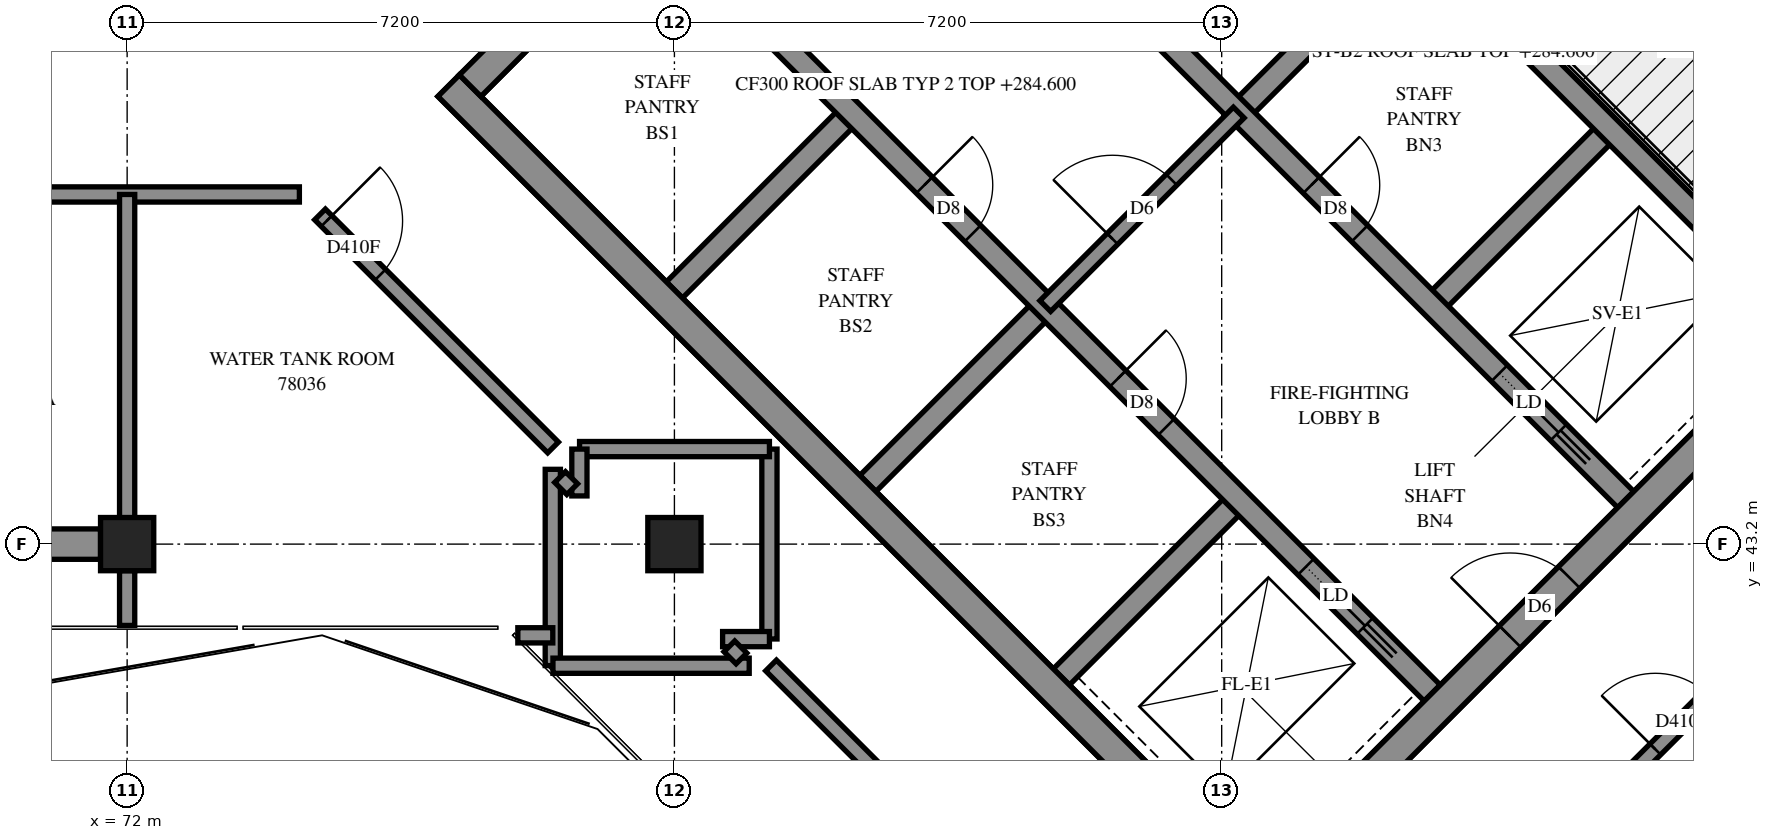
"""IFC4 building model, lengths in metres.
Left out: names, types, materials, properties, quantities, classifications, styles, units other than length and angle.
Written with IfcOpenShell. Run it as: python <this file> out.ifc"""

import sys

from ifc_helpers import new_model, si_unit, direction, frame, frame_2d, origin, origin_2d, place, context, subcontext, project, spatial, rectangle, extrude, element, fill, save


model = new_model("IFC4")
c1 = context("Model", 3, precision=1e-05, world=origin(), true_north=direction((0.0, 1.0)))
c2 = subcontext(c1, "Body", "Model", "MODEL_VIEW")
j1 = project(units=[si_unit("LENGTHUNIT", "METRE"), si_unit("PLANEANGLEUNIT", "RADIAN")], contexts=[c1])
p1 = place(None, origin())
s1 = spatial("IfcSite", under=j1, at=p1, CompositionType="ELEMENT")
p2 = place(p1, origin())
s2 = spatial("IfcBuilding", under=s1, at=p2, CompositionType="ELEMENT")
p3 = place(p2, frame((0.0, 0.0, 284.6)))
s3 = spatial("IfcBuildingStorey", under=s2, at=p3, CompositionType="ELEMENT", Elevation=284.6)
for number, where, z_axis, x_axis in (
    (1, (72.0, 43.2, 0.0), (0.0, 0.0, 1.0), (1.0, 0.0, 0.0)),
    (2, (79.2, 43.2, 0.0), (0.0, 0.0, 1.0), (1.0, 0.0, 0.0)),
):
    element("IfcColumn", number, at=place(p3, frame(where, z_axis=z_axis, x_axis=x_axis)), inside=s3, PredefinedType="COLUMN", context=c2, shape_type="SweptSolid", body=[
        extrude(rectangle(XDim=0.7, YDim=0.7, at=origin_2d()), origin(), (0.0, 0.0, 1.0), 5.7),
    ])
p4 = place(p3, frame((76.23, 49.231, -0.3), z_axis=(0.0, 0.0, 1.0), x_axis=(0.7071034917, -0.7071100706, 0.0)))
e3 = element("IfcWall", 3, at=p4, inside=s3, PredefinedType="SHEAR", context=c2, shape_type="SweptSolid", body=[
    extrude(rectangle(XDim=15.2, YDim=0.4, at=frame_2d((7.6, 0.0))), origin(), (0.0, 0.0, 1.0), 5.3),
])
p5 = place(p3, frame((86.695, 59.696, -0.3), z_axis=(0.0, 0.0, 1.0), x_axis=(0.7071100706, -0.7071034917, 0.0)))
e4 = element("IfcWall", 4, at=p5, inside=s3, PredefinedType="SHEAR", context=c2, shape_type="SweptSolid", body=[
    extrude(rectangle(XDim=15.2, YDim=0.4, at=frame_2d((7.6, 0.0))), origin(), (0.0, 0.0, 1.0), 5.3),
])
p6 = place(p5, frame((10.4, 0.0, 0.3)))
e5 = element("IfcOpeningElement", 5, at=p6, cuts=e4, PredefinedType="OPENING", context=c2, shape_type="SweptSolid", body=[
    extrude(rectangle(XDim=0.8, YDim=2.1, at=frame_2d((0.4, 1.05))), frame((0.0, 0.21, 0.0), z_axis=(0.0, -1.0, 0.0), x_axis=(1.0, 0.0, 0.0)), (0.0, 0.0, 1.0), 0.42),
])
p7 = place(p3, frame((76.513, 49.231, -0.3), z_axis=(0.0, 0.0, 1.0), x_axis=(0.7071067812, 0.7071067812, 0.0)))
e6 = element("IfcWall", 6, at=p7, inside=s3, PredefinedType="SHEAR", context=c2, shape_type="SweptSolid", body=[
    extrude(rectangle(XDim=14.4, YDim=0.4, at=frame_2d((7.2, 0.0))), origin(), (0.0, 0.0, 1.0), 5.3),
])
p8 = place(p7, frame((4.55, 0.0, 0.3)))
e7 = element("IfcOpeningElement", 7, at=p8, cuts=e6, PredefinedType="OPENING", context=c2, shape_type="SweptSolid", body=[
    extrude(rectangle(XDim=1.1, YDim=2.1, at=frame_2d((0.55, 1.05))), frame((0.0, 0.21, 0.0), z_axis=(0.0, -1.0, 0.0), x_axis=(1.0, 0.0, 0.0)), (0.0, 0.0, 1.0), 0.42),
])
p9 = place(p7, frame((11.35, 0.0, 0.3)))
e8 = element("IfcOpeningElement", 8, at=p9, cuts=e6, PredefinedType="OPENING", context=c2, shape_type="SweptSolid", body=[
    extrude(rectangle(XDim=1.1, YDim=2.1, at=frame_2d((0.55, 1.05))), frame((0.0, 0.21, 0.0), z_axis=(0.0, -1.0, 0.0), x_axis=(1.0, 0.0, 0.0)), (0.0, 0.0, 1.0), 0.42),
])
p10 = place(p3, frame((86.978, 38.766, -0.3), z_axis=(0.0, 0.0, 1.0), x_axis=(0.7071067812, 0.7071067812, 0.0)))
e9 = element("IfcWall", 9, at=p10, inside=s3, PredefinedType="SHEAR", context=c2, shape_type="SweptSolid", body=[
    extrude(rectangle(XDim=14.4, YDim=0.4, at=frame_2d((7.2, 0.0))), origin(), (0.0, 0.0, 1.0), 5.3),
])
p11 = place(p10, frame((4.55, 0.0, 0.3)))
e10 = element("IfcOpeningElement", 10, at=p11, cuts=e9, PredefinedType="OPENING", context=c2, shape_type="SweptSolid", body=[
    extrude(rectangle(XDim=1.1, YDim=2.1, at=frame_2d((0.55, 1.05))), frame((0.0, 0.21, 0.0), z_axis=(0.0, -1.0, 0.0), x_axis=(1.0, 0.0, 0.0)), (0.0, 0.0, 1.0), 0.42),
])
p12 = place(p10, frame((11.35, 0.0, 0.3)))
e11 = element("IfcOpeningElement", 11, at=p12, cuts=e9, PredefinedType="OPENING", context=c2, shape_type="SweptSolid", body=[
    extrude(rectangle(XDim=1.1, YDim=2.1, at=frame_2d((0.55, 1.05))), frame((0.0, 0.21, 0.0), z_axis=(0.0, -1.0, 0.0), x_axis=(1.0, 0.0, 0.0)), (0.0, 0.0, 1.0), 0.42),
])
p13 = place(p3, frame((79.2, 46.544, 0.0), z_axis=(0.0, 0.0, 1.0), x_axis=(0.7071219326, 0.7070916295, 0.0)))
e12 = element("IfcWall", 12, at=p13, inside=s3, PredefinedType="SOLIDWALL", context=c2, shape_type="SweptSolid", body=[
    extrude(rectangle(XDim=3.3, YDim=0.3, at=frame_2d((1.65, 0.0))), origin(), (0.0, 0.0, 1.0), 5.7),
])
p14 = place(p3, frame((81.746, 43.999, 0.0), z_axis=(0.0, 0.0, 1.0), x_axis=(0.7071067812, 0.7071067812, 0.0)))
e13 = element("IfcWall", 13, at=p14, inside=s3, PredefinedType="SOLIDWALL", context=c2, shape_type="SweptSolid", body=[
    extrude(rectangle(XDim=3.3, YDim=0.3, at=frame_2d((1.65, 0.0))), origin(), (0.0, 0.0, 1.0), 5.7),
])
p15 = place(p3, frame((86.625, 48.878, 0.0), z_axis=(0.0, 0.0, 1.0), x_axis=(0.7071067812, 0.7071067812, 0.0)))
e14 = element("IfcWall", 14, at=p15, inside=s3, PredefinedType="SOLIDWALL", context=c2, shape_type="SweptSolid", body=[
    extrude(rectangle(XDim=3.3, YDim=0.3, at=frame_2d((1.65, 0.0))), origin(), (0.0, 0.0, 1.0), 5.7),
])
p16 = place(p3, frame((84.291, 41.453, 0.0), z_axis=(0.0, 0.0, 1.0), x_axis=(0.7071067812, 0.7071067812, 0.0)))
e15 = element("IfcWall", 15, at=p16, inside=s3, PredefinedType="SOLIDWALL", context=c2, shape_type="SweptSolid", body=[
    extrude(rectangle(XDim=3.3, YDim=0.3, at=frame_2d((1.65, 0.0))), origin(), (0.0, 0.0, 1.0), 5.7),
])
p17 = place(p3, frame((89.17, 46.332, 0.0), z_axis=(0.0, 0.0, 1.0), x_axis=(0.7071067812, 0.7071067812, 0.0)))
e16 = element("IfcWall", 16, at=p17, inside=s3, PredefinedType="SOLIDWALL", context=c2, shape_type="SweptSolid", body=[
    extrude(rectangle(XDim=3.3, YDim=0.3, at=frame_2d((1.65, 0.0))), origin(), (0.0, 0.0, 1.0), 5.7),
])
p18 = place(p3, frame((78.988, 51.423, 0.0), z_axis=(0.0, 0.0, 1.0), x_axis=(0.7071067812, -0.7071067812, 0.0)))
e17 = element("IfcWall", 17, at=p18, inside=s3, PredefinedType="SOLIDWALL", context=c2, shape_type="SweptSolid", body=[
    extrude(rectangle(XDim=14.4, YDim=0.3, at=frame_2d((7.2, 0.0))), origin(), (0.0, 0.0, 1.0), 5.7),
])
p19 = place(p18, frame((1.35, 0.0, 0.0)))
e18 = element("IfcOpeningElement", 18, at=p19, cuts=e17, PredefinedType="OPENING", context=c2, shape_type="SweptSolid", body=[
    extrude(rectangle(XDim=0.9, YDim=2.1, at=frame_2d((0.45, 1.05))), frame((0.0, 0.16, 0.0), z_axis=(0.0, -1.0, 0.0), x_axis=(1.0, 0.0, 0.0)), (0.0, 0.0, 1.0), 0.32),
])
p20 = place(p18, frame((4.95, 0.0, 0.0)))
e19 = element("IfcOpeningElement", 19, at=p20, cuts=e17, PredefinedType="OPENING", context=c2, shape_type="SweptSolid", body=[
    extrude(rectangle(XDim=0.9, YDim=2.1, at=frame_2d((0.45, 1.05))), frame((0.0, 0.16, 0.0), z_axis=(0.0, -1.0, 0.0), x_axis=(1.0, 0.0, 0.0)), (0.0, 0.0, 1.0), 0.32),
])
p21 = place(p18, frame((8.55, 0.0, 0.0)))
e20 = element("IfcOpeningElement", 20, at=p21, cuts=e17, PredefinedType="OPENING", context=c2, shape_type="SweptSolid", body=[
    extrude(rectangle(XDim=0.9, YDim=2.1, at=frame_2d((0.45, 1.05))), frame((0.0, 0.16, 0.0), z_axis=(0.0, -1.0, 0.0), x_axis=(1.0, 0.0, 0.0)), (0.0, 0.0, 1.0), 0.32),
])
p22 = place(p18, frame((12.05, 0.0, 0.0)))
e21 = element("IfcOpeningElement", 21, at=p22, cuts=e17, PredefinedType="OPENING", context=c2, shape_type="SweptSolid", body=[
    extrude(rectangle(XDim=1.1, YDim=2.1, at=frame_2d((0.55, 1.05))), frame((0.0, 0.16, 0.0), z_axis=(0.0, -1.0, 0.0), x_axis=(1.0, 0.0, 0.0)), (0.0, 0.0, 1.0), 0.32),
])
p23 = place(p3, frame((81.534, 53.969, 0.0), z_axis=(0.0, 0.0, 1.0), x_axis=(0.707103309, -0.7071102534, 0.0)))
e22 = element("IfcWall", 22, at=p23, inside=s3, PredefinedType="SOLIDWALL", context=c2, shape_type="SweptSolid", body=[
    extrude(rectangle(XDim=14.4, YDim=0.3, at=frame_2d((7.2, 0.0))), origin(), (0.0, 0.0, 1.0), 5.7),
])
p24 = place(p23, frame((8.55, 0.0, 0.0)))
e23 = element("IfcOpeningElement", 23, at=p24, cuts=e22, PredefinedType="OPENING", context=c2, shape_type="SweptSolid", body=[
    extrude(rectangle(XDim=0.9, YDim=2.1, at=frame_2d((0.45, 1.05))), frame((0.0, 0.16, 0.0), z_axis=(0.0, -1.0, 0.0), x_axis=(1.0, 0.0, 0.0)), (0.0, 0.0, 1.0), 0.32),
])
p25 = place(p23, frame((12.05, 0.0, 0.0)))
e24 = element("IfcOpeningElement", 24, at=p25, cuts=e22, PredefinedType="OPENING", context=c2, shape_type="SweptSolid", body=[
    extrude(rectangle(XDim=1.1, YDim=2.1, at=frame_2d((0.55, 1.05))), frame((0.0, 0.16, 0.0), z_axis=(0.0, -1.0, 0.0), x_axis=(1.0, 0.0, 0.0)), (0.0, 0.0, 1.0), 0.32),
])
p26 = place(p3, frame((88.958, 51.211, 0.0), z_axis=(0.0, 0.0, 1.0), x_axis=(0.7070998367, -0.7071137256, 0.0)))
e25 = element("IfcWall", 25, at=p26, inside=s3, PredefinedType="SOLIDWALL", context=c2, shape_type="SweptSolid", body=[
    extrude(rectangle(XDim=7.2, YDim=0.3, at=frame_2d((3.6, 0.0))), origin(), (0.0, 0.0, 1.0), 5.7),
])
p27 = place(p3, frame((91.313, 53.354, 0.0), z_axis=(0.0, 0.0, 1.0), x_axis=(0.7071140275, -0.7070995348, 0.0)))
e26 = element("IfcWall", 26, at=p27, inside=s3, PredefinedType="PARTITIONING", context=c2, shape_type="SweptSolid", body=[
    extrude(rectangle(XDim=6.9, YDim=0.15, at=frame_2d((3.45, 0.0))), origin(), (0.0, 0.0, 1.0), 5.7),
])
p28 = place(p3, frame((84.079, 46.332, 0.0), z_axis=(0.0, 0.0, 1.0), x_axis=(0.7071067812, 0.7071067812, 0.0)))
e27 = element("IfcWall", 27, at=p28, inside=s3, PredefinedType="PARTITIONING", context=c2, shape_type="SweptSolid", body=[
    extrude(rectangle(XDim=3.6, YDim=0.2, at=frame_2d((1.8, 0.0))), origin(), (0.0, 0.0, 1.0), 5.7),
])
p29 = place(p28, frame((1.25, 0.0, 0.0)))
e28 = element("IfcOpeningElement", 28, at=p29, cuts=e27, PredefinedType="OPENING", context=c2, shape_type="SweptSolid", body=[
    extrude(rectangle(XDim=1.1, YDim=2.1, at=frame_2d((0.55, 1.05))), frame((0.0, 0.11, 0.0), z_axis=(0.0, -1.0, 0.0), x_axis=(1.0, 0.0, 0.0)), (0.0, 0.0, 1.0), 0.22),
])
p30 = place(p3, frame((86.833, 62.947, 0.0), z_axis=(0.0, 0.0, 1.0), x_axis=(0.7071067812, -0.7071067812, 0.0)))
e29 = element("IfcWall", 29, at=p30, inside=s3, PredefinedType="PARTITIONING", context=c2, shape_type="SweptSolid", body=[
    extrude(rectangle(XDim=19.601, YDim=0.2, at=frame_2d((9.8, 0.0))), origin(), (0.0, 0.0, 1.0), 5.7),
])
p31 = place(p30, frame((6.487, 0.0, 0.0)))
e30 = element("IfcOpeningElement", 30, at=p31, cuts=e29, PredefinedType="OPENING", context=c2, shape_type="SweptSolid", body=[
    extrude(rectangle(XDim=1.0, YDim=2.1, at=frame_2d((0.5, 1.05))), frame((0.0, 0.11, 0.0), z_axis=(0.0, -1.0, 0.0), x_axis=(1.0, 0.0, 0.0)), (0.0, 0.0, 1.0), 0.22),
])
p32 = place(p30, frame((13.688, 0.0, 0.0)))
e31 = element("IfcOpeningElement", 31, at=p32, cuts=e29, PredefinedType="OPENING", context=c2, shape_type="SweptSolid", body=[
    extrude(rectangle(XDim=1.0, YDim=2.1, at=frame_2d((0.5, 1.05))), frame((0.0, 0.11, 0.0), z_axis=(0.0, -1.0, 0.0), x_axis=(1.0, 0.0, 0.0)), (0.0, 0.0, 1.0), 0.22),
])
p33 = place(p3, frame((55.0, 47.8, 0.0), z_axis=(0.0, 0.0, 1.0), x_axis=(1.0, 0.0, 0.0)))
e32 = element("IfcWall", 32, at=p33, inside=s3, PredefinedType="PARTITIONING", context=c2, shape_type="SweptSolid", body=[
    extrude(rectangle(XDim=19.266, YDim=0.2, at=frame_2d((9.633, 0.0))), origin(), (0.0, 0.0, 1.0), 5.7),
])
p34 = place(p33, frame((4.633, 0.0, 0.0)))
e33 = element("IfcOpeningElement", 33, at=p34, cuts=e32, PredefinedType="OPENING", context=c2, shape_type="SweptSolid", body=[
    extrude(rectangle(XDim=1.0, YDim=2.1, at=frame_2d((0.5, 1.05))), frame((0.0, 0.11, 0.0), z_axis=(0.0, -1.0, 0.0), x_axis=(1.0, 0.0, 0.0)), (0.0, 0.0, 1.0), 0.22),
])
p35 = place(p33, frame((6.707, 0.0, 0.0)))
e34 = element("IfcOpeningElement", 34, at=p35, cuts=e32, PredefinedType="OPENING", context=c2, shape_type="SweptSolid", body=[
    extrude(rectangle(XDim=1.0, YDim=2.1, at=frame_2d((0.5, 1.05))), frame((0.0, 0.11, 0.0), z_axis=(0.0, -1.0, 0.0), x_axis=(1.0, 0.0, 0.0)), (0.0, 0.0, 1.0), 0.22),
])
p36 = place(p33, frame((11.832, 0.0, 0.0)))
e35 = element("IfcOpeningElement", 35, at=p36, cuts=e32, PredefinedType="OPENING", context=c2, shape_type="SweptSolid", body=[
    extrude(rectangle(XDim=1.0, YDim=2.1, at=frame_2d((0.5, 1.05))), frame((0.0, 0.11, 0.0), z_axis=(0.0, -1.0, 0.0), x_axis=(1.0, 0.0, 0.0)), (0.0, 0.0, 1.0), 0.22),
])
p37 = place(p33, frame((13.908, 0.0, 0.0)))
e36 = element("IfcOpeningElement", 36, at=p37, cuts=e32, PredefinedType="OPENING", context=c2, shape_type="SweptSolid", body=[
    extrude(rectangle(XDim=1.0, YDim=2.1, at=frame_2d((0.5, 1.05))), frame((0.0, 0.11, 0.0), z_axis=(0.0, -1.0, 0.0), x_axis=(1.0, 0.0, 0.0)), (0.0, 0.0, 1.0), 0.22),
])
p38 = place(p3, frame((86.079, 33.061, 0.0), z_axis=(0.0, 0.0, 1.0), x_axis=(0.7071067812, 0.7071067812, 0.0)))
e37 = element("IfcWall", 37, at=p38, inside=s3, PredefinedType="PARTITIONING", context=c2, shape_type="SweptSolid", body=[
    extrude(rectangle(XDim=10.771, YDim=0.2, at=frame_2d((5.385, 0.0))), origin(), (0.0, 0.0, 1.0), 5.7),
])
p39 = place(p3, frame((80.472, 41.603, 0.0), z_axis=(0.0, 0.0, 1.0), x_axis=(0.7071067812, -0.7071067812, 0.0)))
e38 = element("IfcWall", 38, at=p39, inside=s3, PredefinedType="PARTITIONING", context=c2, shape_type="SweptSolid", body=[
    extrude(rectangle(XDim=9.006, YDim=0.2, at=frame_2d((4.503, 0.0))), origin(), (0.0, 0.0, 1.0), 5.7),
])
p40 = place(p3, frame((86.837, 35.233, 0.0), z_axis=(0.0, 0.0, 1.0), x_axis=(0.7071067812, 0.7071067812, 0.0)))
e39 = element("IfcWall", 39, at=p40, inside=s3, PredefinedType="PARTITIONING", context=c2, shape_type="SweptSolid", body=[
    extrude(rectangle(XDim=8.697, YDim=0.2, at=frame_2d((4.349, 0.0))), origin(), (0.0, 0.0, 1.0), 5.7),
])
p41 = place(p40, frame((7.45, 0.0, 0.0)))
e40 = element("IfcOpeningElement", 40, at=p41, cuts=e39, PredefinedType="OPENING", context=c2, shape_type="SweptSolid", body=[
    extrude(rectangle(XDim=1.0, YDim=2.1, at=frame_2d((0.5, 1.05))), frame((0.0, 0.11, 0.0), z_axis=(0.0, -1.0, 0.0), x_axis=(1.0, 0.0, 0.0)), (0.0, 0.0, 1.0), 0.22),
])
p42 = place(p3, frame((74.537, 47.538, 0.0), z_axis=(0.0, 0.0, 1.0), x_axis=(0.7071067812, -0.7071067812, 0.0)))
e41 = element("IfcWall", 41, at=p42, inside=s3, PredefinedType="PARTITIONING", context=c2, shape_type="SweptSolid", body=[
    extrude(rectangle(XDim=4.336, YDim=0.2, at=frame_2d((2.168, 0.0))), origin(), (0.0, 0.0, 1.0), 5.7),
])
p43 = place(p42, frame((0.122, 0.0, 0.0)))
e42 = element("IfcOpeningElement", 42, at=p43, cuts=e41, PredefinedType="OPENING", context=c2, shape_type="SweptSolid", body=[
    extrude(rectangle(XDim=1.0, YDim=2.1, at=frame_2d((0.5, 1.05))), frame((0.0, 0.11, 0.0), z_axis=(0.0, -1.0, 0.0), x_axis=(1.0, 0.0, 0.0)), (0.0, 0.0, 1.0), 0.22),
])
p44 = place(p3, frame((72.0, 42.85, 0.0), z_axis=(0.0, 0.0, 1.0), x_axis=(0.0, 1.0, 0.0)))
e43 = element("IfcWall", 43, at=p44, inside=s3, PredefinedType="PARTITIONING", context=c2, shape_type="SweptSolid", body=[
    extrude(rectangle(XDim=4.95, YDim=0.2, at=frame_2d((2.475, 0.0))), origin(), (0.0, 0.0, 1.0), 5.7),
])
for number, where, z_axis, x_axis in (
    (44, (77.6, 41.602, 0.0), (0.0, 0.0, 1.0), (0.0, 1.0, 0.0)),
    (45, (77.602, 41.6, 0.0), (0.0, 0.0, 1.0), (1.0, 0.0, 0.0)),
):
    element("IfcWall", number, at=place(p3, frame(where, z_axis=z_axis, x_axis=x_axis)), inside=s3, PredefinedType="PARTITIONING", context=c2, shape_type="SweptSolid", body=[
        extrude(rectangle(XDim=2.582, YDim=0.2, at=frame_2d((1.291, 0.0))), origin(), (0.0, 0.0, 1.0), 5.7),
    ])
for number, where, z_axis, x_axis in (
    (46, (80.45, 41.952, 0.0), (0.0, 0.0, 1.0), (0.0, 1.0, 0.0)),
    (47, (77.952, 44.45, 0.0), (0.0, 0.0, 1.0), (1.0, 0.0, 0.0)),
):
    element("IfcWall", number, at=place(p3, frame(where, z_axis=z_axis, x_axis=x_axis)), inside=s3, PredefinedType="PARTITIONING", context=c2, shape_type="SweptSolid", body=[
        extrude(rectangle(XDim=2.498, YDim=0.2, at=frame_2d((1.249, 0.0))), origin(), (0.0, 0.0, 1.0), 5.7),
    ])
p45 = place(p3, frame((72.0, 42.13, 0.0), z_axis=(0.0, 0.0, 1.0), x_axis=(0.0, 1.0, 0.0)))
e48 = element("IfcWall", 48, at=p45, inside=s3, PredefinedType="PARTITIONING", context=c2, shape_type="SweptSolid", body=[
    extrude(rectangle(XDim=0.72, YDim=0.2, at=frame_2d((0.36, 0.0))), origin(), (0.0, 0.0, 1.0), 5.7),
])
for number, where, z_axis, x_axis in (
    (49, (79.834, 41.95, 0.0), (0.0, 0.0, 1.0), (1.0, 0.0, 0.0)),
    (50, (77.95, 43.834, 0.0), (0.0, 0.0, 1.0), (0.0, 1.0, 0.0)),
):
    element("IfcWall", number, at=place(p3, frame(where, z_axis=z_axis, x_axis=x_axis)), inside=s3, PredefinedType="PARTITIONING", context=c2, shape_type="SweptSolid", body=[
        extrude(rectangle(XDim=0.616, YDim=0.2, at=frame_2d((0.308, 0.0))), origin(), (0.0, 0.0, 1.0), 5.7),
    ])
for number, where, z_axis, x_axis in (
    (51, (77.696, 44.082, 0.0), (0.0, 0.0, 1.0), (0.707, -0.707, 0.0)),
    (52, (79.923, 41.855, 0.0), (0.0, 0.0, 1.0), (0.707, -0.707, 0.0)),
):
    element("IfcWall", number, at=place(p3, frame(where, z_axis=z_axis, x_axis=x_axis)), inside=s3, PredefinedType="PARTITIONING", context=c2, shape_type="SweptSolid", body=[
        extrude(rectangle(XDim=0.225, YDim=0.2, at=frame_2d((0.112, 0.0))), origin(), (0.0, 0.0, 1.0), 5.7),
    ])
p46 = place(p3, frame((77.14, 42.0, 0.0), z_axis=(0.0, 0.0, 1.0), x_axis=(1.0, 0.0, 0.0)))
e53 = element("IfcWall", 53, at=p46, inside=s3, PredefinedType="PARTITIONING", context=c2, shape_type="SweptSolid", body=[
    extrude(rectangle(XDim=0.46, YDim=0.2, at=frame_2d((0.23, 0.0))), origin(), (0.0, 0.0, 1.0), 5.7),
])
p47 = place(p11, origin())
e54 = element("IfcDoor", 54, at=p47, inside=s3, OperationType="DOUBLE_DOOR_SINGLE_SWING", PredefinedType="DOOR", context=c2, shape_type="SweptSolid", body=[
    extrude(rectangle(XDim=1.1, YDim=2.1, at=frame_2d((0.55, 1.05))), frame((0.0, 0.025, 0.0), z_axis=(0.0, -1.0, 0.0), x_axis=(1.0, 0.0, 0.0)), (0.0, 0.0, 1.0), 0.05),
])
fill(e10, e54)
p48 = place(p29, origin())
e55 = element("IfcDoor", 55, at=p48, inside=s3, OperationType="DOUBLE_DOOR_SINGLE_SWING", PredefinedType="DOOR", context=c2, shape_type="SweptSolid", body=[
    extrude(rectangle(XDim=1.1, YDim=2.1, at=frame_2d((0.55, 1.05))), frame((0.0, 0.025, 0.0), z_axis=(0.0, -1.0, 0.0), x_axis=(1.0, 0.0, 0.0)), (0.0, 0.0, 1.0), 0.05),
])
fill(e28, e55)
p49 = place(p20, origin())
e56 = element("IfcDoor", 56, at=p49, inside=s3, OperationType="SINGLE_SWING_LEFT", PredefinedType="DOOR", context=c2, shape_type="SweptSolid", body=[
    extrude(rectangle(XDim=0.9, YDim=2.1, at=frame_2d((0.45, 1.05))), frame((0.0, 0.025, 0.0), z_axis=(0.0, -1.0, 0.0), x_axis=(1.0, 0.0, 0.0)), (0.0, 0.0, 1.0), 0.05),
])
fill(e19, e56)
p50 = place(p21, origin())
e57 = element("IfcDoor", 57, at=p50, inside=s3, OperationType="SINGLE_SWING_LEFT", PredefinedType="DOOR", context=c2, shape_type="SweptSolid", body=[
    extrude(rectangle(XDim=0.9, YDim=2.1, at=frame_2d((0.45, 1.05))), frame((0.0, 0.025, 0.0), z_axis=(0.0, -1.0, 0.0), x_axis=(1.0, 0.0, 0.0)), (0.0, 0.0, 1.0), 0.05),
])
fill(e20, e57)
p51 = place(p24, origin())
e58 = element("IfcDoor", 58, at=p51, inside=s3, OperationType="SINGLE_SWING_LEFT", PredefinedType="DOOR", context=c2, shape_type="SweptSolid", body=[
    extrude(rectangle(XDim=0.9, YDim=2.1, at=frame_2d((0.45, 1.05))), frame((0.0, 0.025, 0.0), z_axis=(0.0, -1.0, 0.0), x_axis=(1.0, 0.0, 0.0)), (0.0, 0.0, 1.0), 0.05),
])
fill(e23, e58)
p52 = place(p22, origin())
e59 = element("IfcDoor", 59, at=p52, inside=s3, OperationType="SLIDING_TO_RIGHT", PredefinedType="DOOR", context=c2, shape_type="SweptSolid", body=[
    extrude(rectangle(XDim=1.1, YDim=2.1, at=frame_2d((0.55, 1.05))), frame((0.0, 0.025, 0.0), z_axis=(0.0, -1.0, 0.0), x_axis=(1.0, 0.0, 0.0)), (0.0, 0.0, 1.0), 0.05),
])
fill(e21, e59)
p53 = place(p25, origin())
e60 = element("IfcDoor", 60, at=p53, inside=s3, OperationType="SLIDING_TO_RIGHT", PredefinedType="DOOR", context=c2, shape_type="SweptSolid", body=[
    extrude(rectangle(XDim=1.1, YDim=2.1, at=frame_2d((0.55, 1.05))), frame((0.0, 0.025, 0.0), z_axis=(0.0, -1.0, 0.0), x_axis=(1.0, 0.0, 0.0)), (0.0, 0.0, 1.0), 0.05),
])
fill(e24, e60)
p54 = place(p43, origin())
e61 = element("IfcDoor", 61, at=p54, inside=s3, OperationType="SINGLE_SWING_LEFT", PredefinedType="DOOR", context=c2, shape_type="SweptSolid", body=[
    extrude(rectangle(XDim=1.0, YDim=2.1, at=frame_2d((0.5, 1.05))), frame((0.0, 0.025, 0.0), z_axis=(0.0, -1.0, 0.0), x_axis=(1.0, 0.0, 0.0)), (0.0, 0.0, 1.0), 0.05),
])
fill(e42, e61)
p55 = place(p41, origin())
e62 = element("IfcDoor", 62, at=p55, inside=s3, OperationType="SINGLE_SWING_LEFT", PredefinedType="DOOR", context=c2, shape_type="SweptSolid", body=[
    extrude(rectangle(XDim=1.0, YDim=2.1, at=frame_2d((0.5, 1.05))), frame((0.0, 0.025, 0.0), z_axis=(0.0, -1.0, 0.0), x_axis=(1.0, 0.0, 0.0)), (0.0, 0.0, 1.0), 0.05),
])
fill(e40, e62)
save(model, sys.argv[1])
